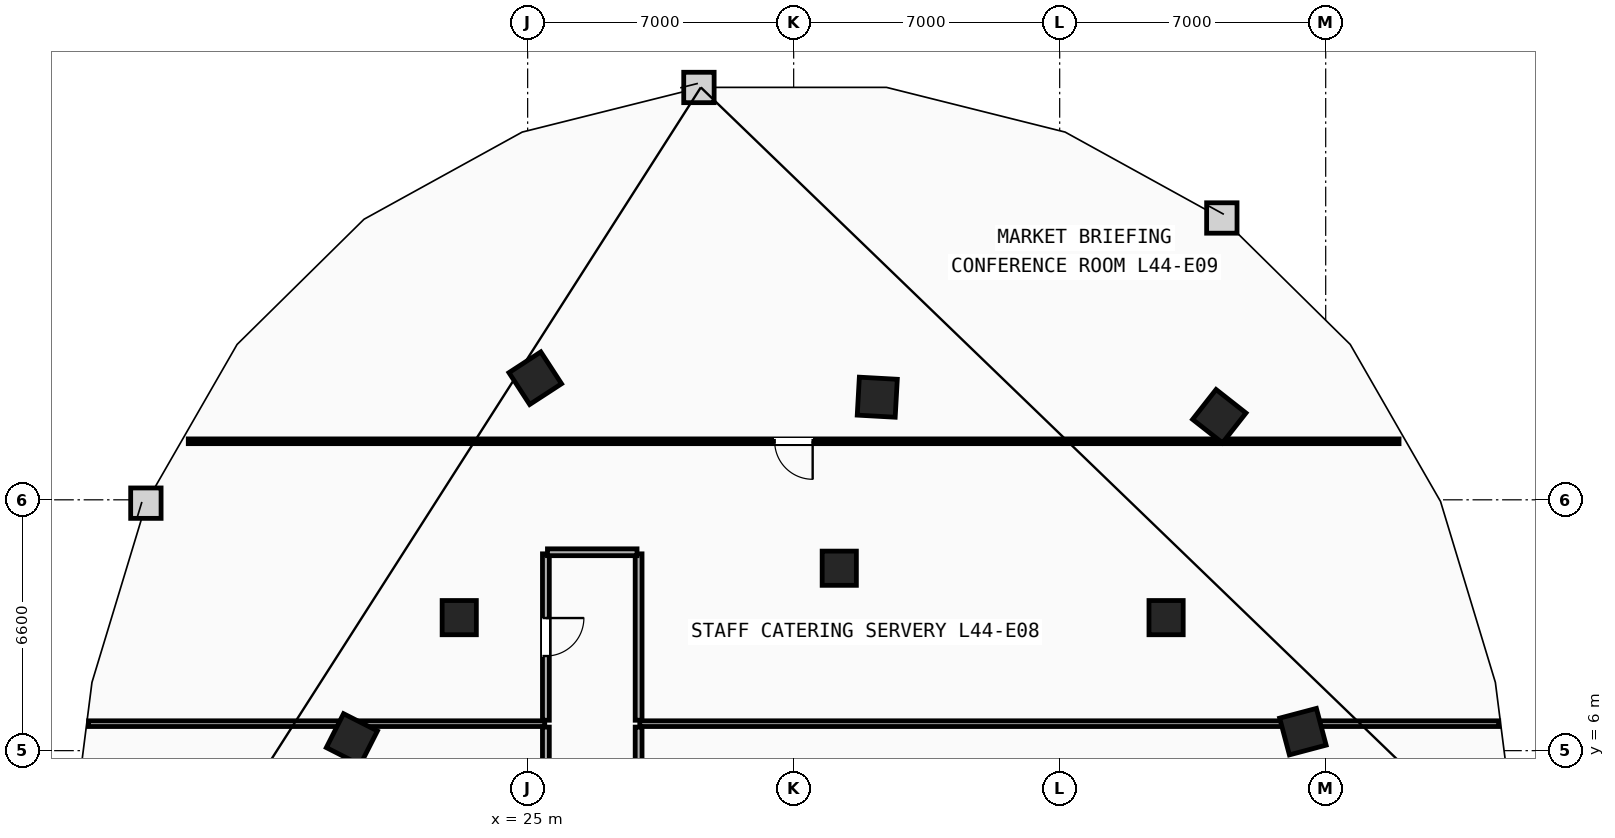
"""IFC4 building model, lengths in metres.
Left out: names, types, materials, properties, quantities, classifications, styles, units other than length and angle.
Written with IfcOpenShell. Run it as: python <this file> out.ifc"""

import sys

from ifc_helpers import new_model, si_unit, direction, frame, frame_2d, origin, origin_2d, place, context, subcontext, project, spatial, rectangle, extrude, element, fill, save


model = new_model("IFC4")
c1 = context("Model", 3, precision=1e-05, world=origin(), true_north=direction((0.0, 1.0)))
c2 = subcontext(c1, "Body", "Model", "MODEL_VIEW")
j1 = project(units=[si_unit("LENGTHUNIT", "METRE"), si_unit("PLANEANGLEUNIT", "RADIAN")], contexts=[c1])
p1 = place(None, origin())
s1 = spatial("IfcSite", under=j1, at=p1, CompositionType="ELEMENT")
p2 = place(p1, origin())
s2 = spatial("IfcBuilding", under=s1, at=p2, CompositionType="ELEMENT")
p3 = place(p2, frame((0.0, 0.0, 169.2)))
s3 = spatial("IfcBuildingStorey", under=s2, at=p3, CompositionType="ELEMENT", Elevation=169.2)
for number, where, z_axis, x_axis in (
    (1, (41.8, 9.5, 0.0), (0.0, 0.0, 1.0), (1.0, 0.0, 0.0)),
    (2, (33.2, 10.8, 0.0), (0.0, 0.0, 1.0), (1.0, 0.0, 0.0)),
    (3, (23.2, 9.5, 0.0), (0.0, 0.0, 1.0), (1.0, 0.0, 0.0)),
):
    element("IfcColumn", number, at=place(p3, frame(where, z_axis=z_axis, x_axis=x_axis)), inside=s3, PredefinedType="COLUMN", context=c2, shape_type="SweptSolid", body=[
        extrude(rectangle(XDim=0.9, YDim=0.9, at=origin_2d()), origin(), (0.0, 0.0, 1.0), 3.6),
    ])
for number, where, z_axis, x_axis in (
    (4, (45.4, 6.5, 0.0), (0.0, 0.0, 1.0), (-0.256, 0.967, 0.0)),
    (5, (43.2, 14.8, 0.0), (0.0, 0.0, 1.0), (-0.786, 0.618, 0.0)),
    (6, (34.2, 15.3, 0.0), (0.0, 0.0, 1.0), (-0.998, 0.055, 0.0)),
    (7, (25.2, 15.8, 0.0), (0.0, 0.0, 1.0), (-0.838, -0.546, 0.0)),
    (8, (20.375, 6.3, 0.0), (0.0, 0.0, 1.0), (-0.453, -0.892, 0.0)),
):
    element("IfcColumn", number, at=place(p3, frame(where, z_axis=z_axis, x_axis=x_axis)), inside=s3, PredefinedType="COLUMN", context=c2, shape_type="SweptSolid", body=[
        extrude(rectangle(XDim=1.0, YDim=1.0, at=origin_2d()), origin(), (0.0, 0.0, 1.0), 3.6),
    ])
p4 = place(p3, frame((13.447, 6.71, 0.0), z_axis=(0.0, 0.0, 1.0), x_axis=(1.0, 0.0, 0.0)))
e9 = element("IfcWall", 9, at=p4, inside=s3, PredefinedType="PARTITIONING", context=c2, shape_type="SweptSolid", body=[
    extrude(rectangle(XDim=12.003, YDim=0.15, at=frame_2d((6.001, 0.0))), origin(), (0.0, 0.0, 1.0), 3.36),
])
p5 = place(p3, frame((27.95, 6.71, 0.0), z_axis=(0.0, 0.0, 1.0), x_axis=(1.0, 0.0, 0.0)))
e10 = element("IfcWall", 10, at=p5, inside=s3, PredefinedType="PARTITIONING", context=c2, shape_type="SweptSolid", body=[
    extrude(rectangle(XDim=22.603, YDim=0.15, at=frame_2d((11.302, 0.0))), origin(), (0.0, 0.0, 1.0), 3.36),
])
p6 = place(p3, frame((25.48, 6.62, 0.0), z_axis=(0.0, 0.0, 1.0), x_axis=(0.0, -1.0, 0.0)))
e11 = element("IfcWall", 11, at=p6, inside=s3, PredefinedType="PARTITIONING", context=c2, shape_type="SweptSolid", body=[
    extrude(rectangle(XDim=6.17, YDim=0.18, at=frame_2d((3.085, 0.0))), origin(), (0.0, 0.0, 1.0), 3.36),
])
p7 = place(p3, frame((27.92, 0.45, 0.0), z_axis=(0.0, 0.0, 1.0), x_axis=(0.0, 1.0, 0.0)))
e12 = element("IfcWall", 12, at=p7, inside=s3, PredefinedType="PARTITIONING", context=c2, shape_type="SweptSolid", body=[
    extrude(rectangle(XDim=6.17, YDim=0.18, at=frame_2d((3.085, 0.0))), origin(), (0.0, 0.0, 1.0), 3.36),
])
p8 = place(p7, frame((2.585, 0.0, 0.0)))
e13 = element("IfcOpeningElement", 13, at=p8, cuts=e12, PredefinedType="OPENING", context=c2, shape_type="SweptSolid", body=[
    extrude(rectangle(XDim=1.0, YDim=2.15, at=frame_2d((0.5, 1.075))), frame((0.0, 0.1, 0.0), z_axis=(0.0, -1.0, 0.0), x_axis=(1.0, 0.0, 0.0)), (0.0, 0.0, 1.0), 0.2),
])
p9 = place(p3, frame((25.48, 11.178, 0.0), z_axis=(0.0, 0.0, 1.0), x_axis=(0.0, -1.0, 0.0)))
e14 = element("IfcWall", 14, at=p9, inside=s3, PredefinedType="PARTITIONING", context=c2, shape_type="SweptSolid", body=[
    extrude(rectangle(XDim=4.378, YDim=0.18, at=frame_2d((2.189, 0.0))), origin(), (0.0, 0.0, 1.0), 3.36),
])
p10 = place(p9, frame((1.689, 0.0, 0.0)))
e15 = element("IfcOpeningElement", 15, at=p10, cuts=e14, PredefinedType="OPENING", context=c2, shape_type="SweptSolid", body=[
    extrude(rectangle(XDim=1.0, YDim=2.15, at=frame_2d((0.5, 1.075))), frame((0.0, 0.1, 0.0), z_axis=(0.0, -1.0, 0.0), x_axis=(1.0, 0.0, 0.0)), (0.0, 0.0, 1.0), 0.2),
])
p11 = place(p3, frame((27.92, 6.8, 0.0), z_axis=(0.0, 0.0, 1.0), x_axis=(0.0, 1.0, 0.0)))
e16 = element("IfcWall", 16, at=p11, inside=s3, PredefinedType="PARTITIONING", context=c2, shape_type="SweptSolid", body=[
    extrude(rectangle(XDim=4.378, YDim=0.18, at=frame_2d((2.189, 0.0))), origin(), (0.0, 0.0, 1.0), 3.36),
])
p12 = place(p3, frame((27.878, 11.22, 0.0), z_axis=(0.0, 0.0, 1.0), x_axis=(-1.0, 0.0, 0.0)))
e17 = element("IfcWall", 17, at=p12, inside=s3, PredefinedType="PARTITIONING", context=c2, shape_type="SweptSolid", body=[
    extrude(rectangle(XDim=2.357, YDim=0.18, at=frame_2d((1.178, 0.0))), origin(), (0.0, 0.0, 1.0), 3.36),
])
p13 = place(p3, frame((47.93, 14.14, 0.0), z_axis=(0.0, 0.0, 1.0), x_axis=(-1.0, 0.0, 0.0)))
e18 = element("IfcWall", 18, at=p13, inside=s3, PredefinedType="PARTITIONING", context=c2, shape_type="SweptSolid", body=[
    extrude(rectangle(XDim=31.86, YDim=0.125, at=frame_2d((15.93, 0.0))), origin(), (0.0, 0.0, 1.0), 3.36),
])
p14 = place(p13, frame((15.43, 0.0, 0.0)))
e19 = element("IfcOpeningElement", 19, at=p14, cuts=e18, PredefinedType="OPENING", context=c2, shape_type="SweptSolid", body=[
    extrude(rectangle(XDim=1.0, YDim=2.15, at=frame_2d((0.5, 1.075))), frame((0.0, 0.073, 0.0), z_axis=(0.0, -1.0, 0.0), x_axis=(1.0, 0.0, 0.0)), (0.0, 0.0, 1.0), 0.145),
])
p15 = place(p14, origin())
e20 = element("IfcDoor", 20, at=p15, inside=s3, OperationType="SINGLE_SWING_LEFT", PredefinedType="DOOR", context=c2, shape_type="SweptSolid", body=[
    extrude(rectangle(XDim=1.0, YDim=2.15, at=frame_2d((0.5, 1.075))), frame((0.0, 0.025, 0.0), z_axis=(0.0, -1.0, 0.0), x_axis=(1.0, 0.0, 0.0)), (0.0, 0.0, 1.0), 0.05),
])
fill(e19, e20)
p16 = place(p10, origin())
e21 = element("IfcDoor", 21, at=p16, inside=s3, OperationType="SINGLE_SWING_LEFT", PredefinedType="DOOR", context=c2, shape_type="SweptSolid", body=[
    extrude(rectangle(XDim=1.0, YDim=2.15, at=frame_2d((0.5, 1.075))), frame((0.0, 0.025, 0.0), z_axis=(0.0, -1.0, 0.0), x_axis=(1.0, 0.0, 0.0)), (0.0, 0.0, 1.0), 0.05),
])
fill(e15, e21)
save(model, sys.argv[1])
